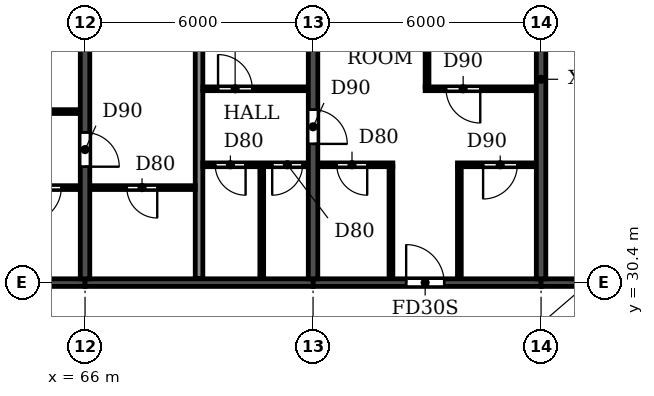
"""IFC4 building model, lengths in metres.
Left out: names, types, materials, properties, quantities, classifications, styles, units other than length and angle.
Written with IfcOpenShell. Run it as: python <this file> out.ifc"""

import sys

from ifc_helpers import new_model, si_unit, direction, frame, frame_2d, origin, place, context, subcontext, project, spatial, rectangle, extrude, element, fill, save


model = new_model("IFC4")
c1 = context("Model", 3, precision=1e-05, world=origin(), true_north=direction((0.0, 1.0)))
c2 = subcontext(c1, "Body", "Model", "MODEL_VIEW")
j1 = project(units=[si_unit("LENGTHUNIT", "METRE"), si_unit("PLANEANGLEUNIT", "RADIAN")], contexts=[c1])
p1 = place(None, origin())
s1 = spatial("IfcSite", under=j1, at=p1, CompositionType="ELEMENT")
p2 = place(p1, origin())
s2 = spatial("IfcBuilding", under=s1, at=p2, CompositionType="ELEMENT")
p3 = place(p2, frame((0.0, 0.0, 208.2)))
s3 = spatial("IfcBuildingStorey", under=s2, at=p3, CompositionType="ELEMENT", Elevation=208.2)
p4 = place(p3, frame((66.0, 30.5, 0.0), z_axis=(0.0, 0.0, 1.0), x_axis=(0.0, 1.0, 0.0)))
e1 = element("IfcWall", 1, at=p4, inside=s3, PredefinedType="SHEAR", context=c2, shape_type="SweptSolid", body=[
    extrude(rectangle(XDim=10.5, YDim=0.25, at=frame_2d((5.25, 0.0))), origin(), (0.0, 0.0, 1.0), 3.0),
])
p5 = place(p4, frame((2.95, 0.0, 0.0)))
e2 = element("IfcOpeningElement", 2, at=p5, cuts=e1, PredefinedType="OPENING", context=c2, shape_type="SweptSolid", body=[
    extrude(rectangle(XDim=0.9, YDim=2.1, at=frame_2d((0.45, 1.05))), frame((0.0, 0.135, 0.0), z_axis=(0.0, -1.0, 0.0), x_axis=(1.0, 0.0, 0.0)), (0.0, 0.0, 1.0), 0.27),
])
p6 = place(p3, frame((72.0, 30.5, 0.0), z_axis=(0.0, 0.0, 1.0), x_axis=(0.0, 1.0, 0.0)))
e3 = element("IfcWall", 3, at=p6, inside=s3, PredefinedType="SHEAR", context=c2, shape_type="SweptSolid", body=[
    extrude(rectangle(XDim=10.5, YDim=0.25, at=frame_2d((5.25, 0.0))), origin(), (0.0, 0.0, 1.0), 3.0),
])
p7 = place(p6, frame((3.55, 0.0, 0.0)))
e4 = element("IfcOpeningElement", 4, at=p7, cuts=e3, PredefinedType="OPENING", context=c2, shape_type="SweptSolid", body=[
    extrude(rectangle(XDim=0.9, YDim=2.1, at=frame_2d((0.45, 1.05))), frame((0.0, 0.135, 0.0), z_axis=(0.0, -1.0, 0.0), x_axis=(1.0, 0.0, 0.0)), (0.0, 0.0, 1.0), 0.27),
])
p8 = place(p3, frame((78.0, 30.5, 0.0), z_axis=(0.0, 0.0, 1.0), x_axis=(0.0, 1.0, 0.0)))
e5 = element("IfcWall", 5, at=p8, inside=s3, PredefinedType="SHEAR", context=c2, shape_type="SweptSolid", body=[
    extrude(rectangle(XDim=10.5, YDim=0.25, at=frame_2d((5.25, 0.0))), origin(), (0.0, 0.0, 1.0), 3.0),
])
p9 = place(p3, frame((60.0, 30.4, 0.0), z_axis=(0.0, 0.0, 1.0), x_axis=(1.0, 0.0, 0.0)))
e6 = element("IfcWall", 6, at=p9, inside=s3, PredefinedType="SHEAR", context=c2, shape_type="SweptSolid", body=[
    extrude(rectangle(XDim=6.0, YDim=0.2, at=frame_2d((3.0, 0.0))), origin(), (0.0, 0.0, 1.0), 2.4),
])
p10 = place(p9, frame((2.45, 0.0, 0.0)))
e7 = element("IfcOpeningElement", 7, at=p10, cuts=e6, PredefinedType="OPENING", context=c2, shape_type="SweptSolid", body=[
    extrude(rectangle(XDim=1.0, YDim=2.1, at=frame_2d((0.5, 1.05))), frame((0.0, 0.11, 0.0), z_axis=(0.0, -1.0, 0.0), x_axis=(1.0, 0.0, 0.0)), (0.0, 0.0, 1.0), 0.22),
])
p11 = place(p3, frame((66.0, 30.4, 0.0), z_axis=(0.0, 0.0, 1.0), x_axis=(1.0, 0.0, 0.0)))
e8 = element("IfcWall", 8, at=p11, inside=s3, PredefinedType="SHEAR", context=c2, shape_type="SweptSolid", body=[
    extrude(rectangle(XDim=6.0, YDim=0.2, at=frame_2d((3.0, 0.0))), origin(), (0.0, 0.0, 1.0), 2.4),
])
p12 = place(p3, frame((72.0, 30.4, 0.0), z_axis=(0.0, 0.0, 1.0), x_axis=(1.0, 0.0, 0.0)))
e9 = element("IfcWall", 9, at=p12, inside=s3, PredefinedType="SHEAR", context=c2, shape_type="SweptSolid", body=[
    extrude(rectangle(XDim=6.0, YDim=0.2, at=frame_2d((3.0, 0.0))), origin(), (0.0, 0.0, 1.0), 2.4),
])
p13 = place(p12, frame((2.45, 0.0, 0.0)))
e10 = element("IfcOpeningElement", 10, at=p13, cuts=e9, PredefinedType="OPENING", context=c2, shape_type="SweptSolid", body=[
    extrude(rectangle(XDim=1.0, YDim=2.1, at=frame_2d((0.5, 1.05))), frame((0.0, 0.11, 0.0), z_axis=(0.0, -1.0, 0.0), x_axis=(1.0, 0.0, 0.0)), (0.0, 0.0, 1.0), 0.22),
])
p14 = place(p3, frame((78.0, 30.4, 0.0), z_axis=(0.0, 0.0, 1.0), x_axis=(1.0, 0.0, 0.0)))
e11 = element("IfcWall", 11, at=p14, inside=s3, PredefinedType="SHEAR", context=c2, shape_type="SweptSolid", body=[
    extrude(rectangle(XDim=5.8, YDim=0.2, at=frame_2d((2.9, 0.0))), origin(), (0.0, 0.0, 1.0), 2.4),
])
p15 = place(p14, frame((2.5, 0.0, 0.0)))
e12 = element("IfcOpeningElement", 12, at=p15, cuts=e11, PredefinedType="OPENING", context=c2, shape_type="SweptSolid", body=[
    extrude(rectangle(XDim=1.0, YDim=2.1, at=frame_2d((0.5, 1.05))), frame((0.0, 0.11, 0.0), z_axis=(0.0, -1.0, 0.0), x_axis=(1.0, 0.0, 0.0)), (0.0, 0.0, 1.0), 0.22),
])
p16 = place(p3, frame((69.0, 30.51, 0.0), z_axis=(0.0, 0.0, 1.0), x_axis=(0.0, 1.0, 0.0)))
e13 = element("IfcWall", 13, at=p16, inside=s3, PredefinedType="PARTITIONING", context=c2, shape_type="SweptSolid", body=[
    extrude(rectangle(XDim=10.63, YDim=0.2, at=frame_2d((5.315, 0.0))), origin(), (0.0, 0.0, 1.0), 3.0),
])
p17 = place(p3, frame((63.8, 32.9, 0.0), z_axis=(0.0, 0.0, 1.0), x_axis=(1.0, 0.0, 0.0)))
e14 = element("IfcWall", 14, at=p17, inside=s3, PredefinedType="PARTITIONING", context=c2, shape_type="SweptSolid", body=[
    extrude(rectangle(XDim=2.065, YDim=0.1, at=frame_2d((1.032, 0.0))), origin(), (0.0, 0.0, 1.0), 3.0),
])
p18 = place(p17, frame((0.675, 0.0, 0.0)))
e15 = element("IfcOpeningElement", 15, at=p18, cuts=e14, PredefinedType="OPENING", context=c2, shape_type="SweptSolid", body=[
    extrude(rectangle(XDim=0.9, YDim=2.1, at=frame_2d((0.45, 1.05))), frame((0.0, 0.06, 0.0), z_axis=(0.0, -1.0, 0.0), x_axis=(1.0, 0.0, 0.0)), (0.0, 0.0, 1.0), 0.12),
])
p19 = place(p3, frame((66.135, 32.9, 0.0), z_axis=(0.0, 0.0, 1.0), x_axis=(1.0, 0.0, 0.0)))
e16 = element("IfcWall", 16, at=p19, inside=s3, PredefinedType="PARTITIONING", context=c2, shape_type="SweptSolid", body=[
    extrude(rectangle(XDim=2.765, YDim=0.1, at=frame_2d((1.382, 0.0))), origin(), (0.0, 0.0, 1.0), 3.0),
])
p20 = place(p19, frame((0.965, 0.0, 0.0)))
e17 = element("IfcOpeningElement", 17, at=p20, cuts=e16, PredefinedType="OPENING", context=c2, shape_type="SweptSolid", body=[
    extrude(rectangle(XDim=0.8, YDim=2.1, at=frame_2d((0.4, 1.05))), frame((0.0, 0.06, 0.0), z_axis=(0.0, -1.0, 0.0), x_axis=(1.0, 0.0, 0.0)), (0.0, 0.0, 1.0), 0.12),
])
p21 = place(p3, frame((69.1, 33.5, 0.0), z_axis=(0.0, 0.0, 1.0), x_axis=(1.0, 0.0, 0.0)))
e18 = element("IfcWall", 18, at=p21, inside=s3, PredefinedType="PARTITIONING", context=c2, shape_type="SweptSolid", body=[
    extrude(rectangle(XDim=2.765, YDim=0.1, at=frame_2d((1.382, 0.0))), origin(), (0.0, 0.0, 1.0), 3.0),
])
p22 = place(p21, frame((0.325, 0.0, 0.0)))
e19 = element("IfcOpeningElement", 19, at=p22, cuts=e18, PredefinedType="OPENING", context=c2, shape_type="SweptSolid", body=[
    extrude(rectangle(XDim=0.8, YDim=2.1, at=frame_2d((0.4, 1.05))), frame((0.0, 0.06, 0.0), z_axis=(0.0, -1.0, 0.0), x_axis=(1.0, 0.0, 0.0)), (0.0, 0.0, 1.0), 0.12),
])
p23 = place(p21, frame((1.825, 0.0, 0.0)))
e20 = element("IfcOpeningElement", 20, at=p23, cuts=e18, PredefinedType="OPENING", context=c2, shape_type="SweptSolid", body=[
    extrude(rectangle(XDim=0.8, YDim=2.1, at=frame_2d((0.4, 1.05))), frame((0.0, 0.06, 0.0), z_axis=(0.0, -1.0, 0.0), x_axis=(1.0, 0.0, 0.0)), (0.0, 0.0, 1.0), 0.12),
])
p24 = place(p3, frame((72.135, 33.5, 0.0), z_axis=(0.0, 0.0, 1.0), x_axis=(1.0, 0.0, 0.0)))
e21 = element("IfcWall", 21, at=p24, inside=s3, PredefinedType="PARTITIONING", context=c2, shape_type="SweptSolid", body=[
    extrude(rectangle(XDim=1.965, YDim=0.1, at=frame_2d((0.982, 0.0))), origin(), (0.0, 0.0, 1.0), 3.0),
])
p25 = place(p24, frame((0.49, 0.0, 0.0)))
e22 = element("IfcOpeningElement", 22, at=p25, cuts=e21, PredefinedType="OPENING", context=c2, shape_type="SweptSolid", body=[
    extrude(rectangle(XDim=0.8, YDim=2.1, at=frame_2d((0.4, 1.05))), frame((0.0, 0.06, 0.0), z_axis=(0.0, -1.0, 0.0), x_axis=(1.0, 0.0, 0.0)), (0.0, 0.0, 1.0), 0.12),
])
p26 = place(p3, frame((75.8, 33.5, 0.0), z_axis=(0.0, 0.0, 1.0), x_axis=(1.0, 0.0, 0.0)))
e23 = element("IfcWall", 23, at=p26, inside=s3, PredefinedType="PARTITIONING", context=c2, shape_type="SweptSolid", body=[
    extrude(rectangle(XDim=2.065, YDim=0.1, at=frame_2d((1.032, 0.0))), origin(), (0.0, 0.0, 1.0), 3.0),
])
p27 = place(p26, frame((0.675, 0.0, 0.0)))
e24 = element("IfcOpeningElement", 24, at=p27, cuts=e23, PredefinedType="OPENING", context=c2, shape_type="SweptSolid", body=[
    extrude(rectangle(XDim=0.9, YDim=2.1, at=frame_2d((0.45, 1.05))), frame((0.0, 0.06, 0.0), z_axis=(0.0, -1.0, 0.0), x_axis=(1.0, 0.0, 0.0)), (0.0, 0.0, 1.0), 0.12),
])
p28 = place(p3, frame((62.95, 34.9, 0.0), z_axis=(0.0, 0.0, 1.0), x_axis=(1.0, 0.0, 0.0)))
e25 = element("IfcWall", 25, at=p28, inside=s3, PredefinedType="PARTITIONING", context=c2, shape_type="SweptSolid", body=[
    extrude(rectangle(XDim=2.915, YDim=0.1, at=frame_2d((1.458, 0.0))), origin(), (0.0, 0.0, 1.0), 3.0),
])
p29 = place(p28, frame((0.55, 0.0, 0.0)))
e26 = element("IfcOpeningElement", 26, at=p29, cuts=e25, PredefinedType="OPENING", context=c2, shape_type="SweptSolid", body=[
    extrude(rectangle(XDim=0.9, YDim=2.1, at=frame_2d((0.45, 1.05))), frame((0.0, 0.06, 0.0), z_axis=(0.0, -1.0, 0.0), x_axis=(1.0, 0.0, 0.0)), (0.0, 0.0, 1.0), 0.12),
])
p30 = place(p3, frame((69.1, 35.5, 0.0), z_axis=(0.0, 0.0, 1.0), x_axis=(1.0, 0.0, 0.0)))
e27 = element("IfcWall", 27, at=p30, inside=s3, PredefinedType="PARTITIONING", context=c2, shape_type="SweptSolid", body=[
    extrude(rectangle(XDim=2.765, YDim=0.1, at=frame_2d((1.382, 0.0))), origin(), (0.0, 0.0, 1.0), 3.0),
])
p31 = place(p30, frame((0.4, 0.0, 0.0)))
e28 = element("IfcOpeningElement", 28, at=p31, cuts=e27, PredefinedType="OPENING", context=c2, shape_type="SweptSolid", body=[
    extrude(rectangle(XDim=0.9, YDim=2.1, at=frame_2d((0.45, 1.05))), frame((0.0, 0.06, 0.0), z_axis=(0.0, -1.0, 0.0), x_axis=(1.0, 0.0, 0.0)), (0.0, 0.0, 1.0), 0.12),
])
p32 = place(p3, frame((74.95, 35.5, 0.0), z_axis=(0.0, 0.0, 1.0), x_axis=(1.0, 0.0, 0.0)))
e29 = element("IfcWall", 29, at=p32, inside=s3, PredefinedType="PARTITIONING", context=c2, shape_type="SweptSolid", body=[
    extrude(rectangle(XDim=2.915, YDim=0.1, at=frame_2d((1.458, 0.0))), origin(), (0.0, 0.0, 1.0), 3.0),
])
p33 = place(p32, frame((0.55, 0.0, 0.0)))
e30 = element("IfcOpeningElement", 30, at=p33, cuts=e29, PredefinedType="OPENING", context=c2, shape_type="SweptSolid", body=[
    extrude(rectangle(XDim=0.9, YDim=2.1, at=frame_2d((0.45, 1.05))), frame((0.0, 0.06, 0.0), z_axis=(0.0, -1.0, 0.0), x_axis=(1.0, 0.0, 0.0)), (0.0, 0.0, 1.0), 0.12),
])
for number, where, z_axis, x_axis in (
    (31, (70.65, 30.51, 0.0), (0.0, 0.0, 1.0), (0.0, 1.0, 0.0)),
    (32, (74.05, 30.51, 0.0), (0.0, 0.0, 1.0), (0.0, 1.0, 0.0)),
):
    element("IfcWall", number, at=place(p3, frame(where, z_axis=z_axis, x_axis=x_axis)), inside=s3, PredefinedType="PARTITIONING", context=c2, shape_type="SweptSolid", body=[
        extrude(rectangle(XDim=2.94, YDim=0.1, at=frame_2d((1.47, 0.0))), origin(), (0.0, 0.0, 1.0), 3.0),
    ])
p34 = place(p3, frame((75.0, 35.55, 0.0), z_axis=(0.0, 0.0, 1.0), x_axis=(0.0, 1.0, 0.0)))
e33 = element("IfcWall", 33, at=p34, inside=s3, PredefinedType="PARTITIONING", context=c2, shape_type="SweptSolid", body=[
    extrude(rectangle(XDim=5.59, YDim=0.1, at=frame_2d((2.795, 0.0))), origin(), (0.0, 0.0, 1.0), 3.0),
])
p35 = place(p3, frame((75.85, 30.51, 0.0), z_axis=(0.0, 0.0, 1.0), x_axis=(0.0, 1.0, 0.0)))
e34 = element("IfcWall", 34, at=p35, inside=s3, PredefinedType="PARTITIONING", context=c2, shape_type="SweptSolid", body=[
    extrude(rectangle(XDim=2.94, YDim=0.1, at=frame_2d((1.47, 0.0))), origin(), (0.0, 0.0, 1.0), 3.0),
])
p36 = place(p20, frame((0.8, 0.0, 0.0), z_axis=(0.0, 0.0, 1.0), x_axis=(-1.0, 0.0, 0.0)))
e35 = element("IfcDoor", 35, at=p36, inside=s3, OperationType="SINGLE_SWING_LEFT", PredefinedType="DOOR", context=c2, shape_type="SweptSolid", body=[
    extrude(rectangle(XDim=0.8, YDim=2.1, at=frame_2d((0.4, 1.05))), frame((0.0, 0.025, 0.0), z_axis=(0.0, -1.0, 0.0), x_axis=(1.0, 0.0, 0.0)), (0.0, 0.0, 1.0), 0.05),
])
fill(e17, e35)
p37 = place(p18, frame((0.9, 0.0, 0.0), z_axis=(0.0, 0.0, 1.0), x_axis=(-1.0, 0.0, 0.0)))
e36 = element("IfcDoor", 36, at=p37, inside=s3, OperationType="SINGLE_SWING_RIGHT", PredefinedType="DOOR", context=c2, shape_type="SweptSolid", body=[
    extrude(rectangle(XDim=0.9, YDim=2.1, at=frame_2d((0.45, 1.05))), frame((0.0, 0.025, 0.0), z_axis=(0.0, -1.0, 0.0), x_axis=(1.0, 0.0, 0.0)), (0.0, 0.0, 1.0), 0.05),
])
fill(e15, e36)
p38 = place(p5, frame((0.9, 0.0, 0.0), z_axis=(0.0, 0.0, 1.0), x_axis=(-1.0, 0.0, 0.0)))
e37 = element("IfcDoor", 37, at=p38, inside=s3, OperationType="SINGLE_SWING_RIGHT", PredefinedType="DOOR", context=c2, shape_type="SweptSolid", body=[
    extrude(rectangle(XDim=0.9, YDim=2.1, at=frame_2d((0.45, 1.05))), frame((0.0, 0.025, 0.0), z_axis=(0.0, -1.0, 0.0), x_axis=(1.0, 0.0, 0.0)), (0.0, 0.0, 1.0), 0.05),
])
fill(e2, e37)
p39 = place(p22, frame((0.8, 0.0, 0.0), z_axis=(0.0, 0.0, 1.0), x_axis=(-1.0, 0.0, 0.0)))
e38 = element("IfcDoor", 38, at=p39, inside=s3, OperationType="SINGLE_SWING_LEFT", PredefinedType="DOOR", context=c2, shape_type="SweptSolid", body=[
    extrude(rectangle(XDim=0.8, YDim=2.1, at=frame_2d((0.4, 1.05))), frame((0.0, 0.025, 0.0), z_axis=(0.0, -1.0, 0.0), x_axis=(1.0, 0.0, 0.0)), (0.0, 0.0, 1.0), 0.05),
])
fill(e19, e38)
p40 = place(p31, origin())
e39 = element("IfcDoor", 39, at=p40, inside=s3, OperationType="SINGLE_SWING_LEFT", PredefinedType="DOOR", context=c2, shape_type="SweptSolid", body=[
    extrude(rectangle(XDim=0.9, YDim=2.1, at=frame_2d((0.45, 1.05))), frame((0.0, 0.025, 0.0), z_axis=(0.0, -1.0, 0.0), x_axis=(1.0, 0.0, 0.0)), (0.0, 0.0, 1.0), 0.05),
])
fill(e28, e39)
p41 = place(p23, frame((0.8, 0.0, 0.0), z_axis=(0.0, 0.0, 1.0), x_axis=(-1.0, 0.0, 0.0)))
e40 = element("IfcDoor", 40, at=p41, inside=s3, OperationType="SINGLE_SWING_RIGHT", PredefinedType="DOOR", context=c2, shape_type="SweptSolid", body=[
    extrude(rectangle(XDim=0.8, YDim=2.1, at=frame_2d((0.4, 1.05))), frame((0.0, 0.025, 0.0), z_axis=(0.0, -1.0, 0.0), x_axis=(1.0, 0.0, 0.0)), (0.0, 0.0, 1.0), 0.05),
])
fill(e20, e40)
p42 = place(p7, frame((0.9, 0.0, 0.0), z_axis=(0.0, 0.0, 1.0), x_axis=(-1.0, 0.0, 0.0)))
e41 = element("IfcDoor", 41, at=p42, inside=s3, OperationType="SINGLE_SWING_RIGHT", PredefinedType="DOOR", context=c2, shape_type="SweptSolid", body=[
    extrude(rectangle(XDim=0.9, YDim=2.1, at=frame_2d((0.45, 1.05))), frame((0.0, 0.025, 0.0), z_axis=(0.0, -1.0, 0.0), x_axis=(1.0, 0.0, 0.0)), (0.0, 0.0, 1.0), 0.05),
])
fill(e4, e41)
p43 = place(p25, frame((0.8, 0.0, 0.0), z_axis=(0.0, 0.0, 1.0), x_axis=(-1.0, 0.0, 0.0)))
e42 = element("IfcDoor", 42, at=p43, inside=s3, OperationType="SINGLE_SWING_LEFT", PredefinedType="DOOR", context=c2, shape_type="SweptSolid", body=[
    extrude(rectangle(XDim=0.8, YDim=2.1, at=frame_2d((0.4, 1.05))), frame((0.0, 0.025, 0.0), z_axis=(0.0, -1.0, 0.0), x_axis=(1.0, 0.0, 0.0)), (0.0, 0.0, 1.0), 0.05),
])
fill(e22, e42)
p44 = place(p13, origin())
e43 = element("IfcDoor", 43, at=p44, inside=s3, OperationType="SINGLE_SWING_LEFT", PredefinedType="DOOR", context=c2, shape_type="SweptSolid", body=[
    extrude(rectangle(XDim=1.0, YDim=2.1, at=frame_2d((0.5, 1.05))), frame((0.0, 0.025, 0.0), z_axis=(0.0, -1.0, 0.0), x_axis=(1.0, 0.0, 0.0)), (0.0, 0.0, 1.0), 0.05),
])
fill(e10, e43)
p45 = place(p33, frame((0.9, 0.0, 0.0), z_axis=(0.0, 0.0, 1.0), x_axis=(-1.0, 0.0, 0.0)))
e44 = element("IfcDoor", 44, at=p45, inside=s3, OperationType="SINGLE_SWING_LEFT", PredefinedType="DOOR", context=c2, shape_type="SweptSolid", body=[
    extrude(rectangle(XDim=0.9, YDim=2.1, at=frame_2d((0.45, 1.05))), frame((0.0, 0.025, 0.0), z_axis=(0.0, -1.0, 0.0), x_axis=(1.0, 0.0, 0.0)), (0.0, 0.0, 1.0), 0.05),
])
fill(e30, e44)
p46 = place(p27, frame((0.9, 0.0, 0.0), z_axis=(0.0, 0.0, 1.0), x_axis=(-1.0, 0.0, 0.0)))
e45 = element("IfcDoor", 45, at=p46, inside=s3, OperationType="SINGLE_SWING_RIGHT", PredefinedType="DOOR", context=c2, shape_type="SweptSolid", body=[
    extrude(rectangle(XDim=0.9, YDim=2.1, at=frame_2d((0.45, 1.05))), frame((0.0, 0.025, 0.0), z_axis=(0.0, -1.0, 0.0), x_axis=(1.0, 0.0, 0.0)), (0.0, 0.0, 1.0), 0.05),
])
fill(e24, e45)
save(model, sys.argv[1])
